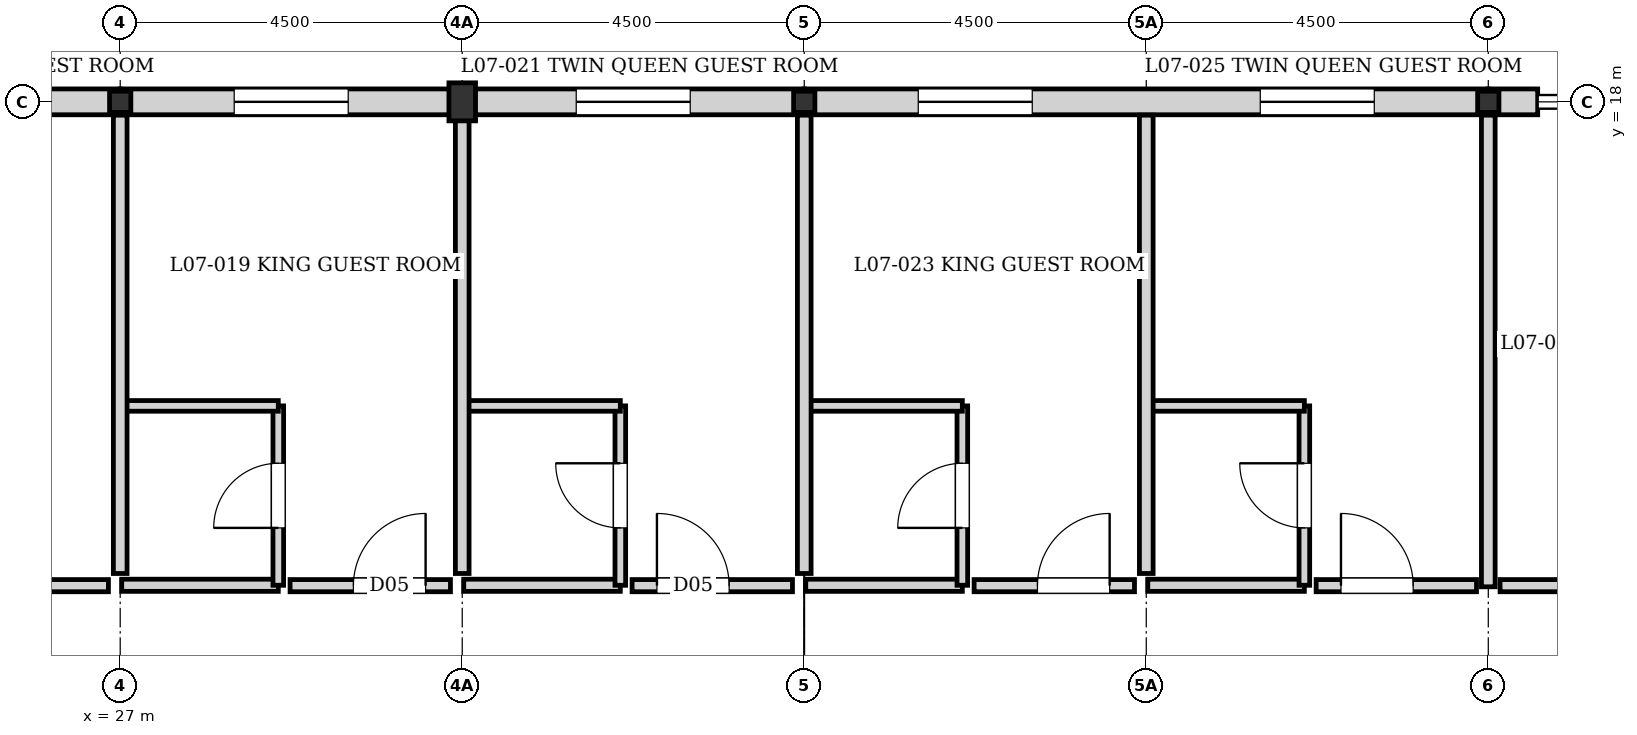
"""IFC4 building model, lengths in metres.
Left out: names, types, materials, properties, quantities, classifications, styles, units other than length and angle.
Written with IfcOpenShell. Run it as: python <this file> out.ifc"""

import sys

from ifc_helpers import new_model, si_unit, direction, frame, frame_2d, origin, origin_2d, place, context, subcontext, project, spatial, rectangle, i_section, extrude, element, fill, save


model = new_model("IFC4")
c1 = context("Model", 3, precision=1e-05, world=origin(), true_north=direction((0.0, 1.0)))
c2 = subcontext(c1, "Body", "Model", "MODEL_VIEW")
j1 = project(units=[si_unit("LENGTHUNIT", "METRE"), si_unit("PLANEANGLEUNIT", "RADIAN")], contexts=[c1])
p1 = place(None, origin())
s1 = spatial("IfcSite", under=j1, at=p1, CompositionType="ELEMENT")
p2 = place(p1, origin())
s2 = spatial("IfcBuilding", under=s1, at=p2, CompositionType="ELEMENT")
p3 = place(p2, frame((0.0, 0.0, 23.68)))
s3 = spatial("IfcBuildingStorey", under=s2, at=p3, CompositionType="ELEMENT", Elevation=23.68)
for number, where, z_axis, x_axis in (
    (1, (27.0, 18.0, 0.0), (0.0, 0.0, 1.0), (1.0, 0.0, 0.0)),
    (2, (36.0, 18.0, 0.0), (0.0, 0.0, 1.0), (1.0, 0.0, 0.0)),
    (3, (45.0, 18.0, 0.0), (0.0, 0.0, 1.0), (1.0, 0.0, 0.0)),
):
    element("IfcColumn", number, at=place(p3, frame(where, z_axis=z_axis, x_axis=x_axis)), inside=s3, PredefinedType="COLUMN", context=c2, shape_type="SweptSolid", body=[
        extrude(i_section(OverallWidth=0.28, OverallDepth=0.28, WebThickness=0.01, FlangeThickness=0.018, at=origin_2d()), origin(), (0.0, 0.0, 1.0), 3.2),
    ])
p4 = place(p3, frame((31.5, 18.0, 0.0), z_axis=(0.0, 0.0, 1.0), x_axis=(1.0, 0.0, 0.0)))
e4 = element("IfcColumn", 4, at=p4, inside=s3, PredefinedType="PILASTER", context=c2, shape_type="SweptSolid", body=[
    extrude(rectangle(XDim=0.35, YDim=0.5, at=origin_2d()), origin(), (0.0, 0.0, 1.0), 3.2),
])
p5 = place(p3, frame((18.0, 18.0, 0.0), z_axis=(0.0, 0.0, 1.0), x_axis=(1.0, 0.0, 0.0)))
e5 = element("IfcWall", 5, at=p5, inside=s3, PredefinedType="SOLIDWALL", context=c2, shape_type="SweptSolid", body=[
    extrude(rectangle(XDim=9.0, YDim=0.34, at=frame_2d((4.5, 0.0))), origin(), (0.0, 0.0, 1.0), 2.56),
])
p6 = place(p5, frame((1.5, 0.0, 0.35)))
e6 = element("IfcOpeningElement", 6, at=p6, cuts=e5, PredefinedType="OPENING", context=c2, shape_type="SweptSolid", body=[
    extrude(rectangle(XDim=1.5, YDim=1.8, at=frame_2d((0.75, 0.9))), frame((0.0, 0.18, 0.0), z_axis=(0.0, -1.0, 0.0), x_axis=(1.0, 0.0, 0.0)), (0.0, 0.0, 1.0), 0.36),
])
p7 = place(p5, frame((6.0, 0.0, 0.35)))
e7 = element("IfcOpeningElement", 7, at=p7, cuts=e5, PredefinedType="OPENING", context=c2, shape_type="SweptSolid", body=[
    extrude(rectangle(XDim=1.5, YDim=1.8, at=frame_2d((0.75, 0.9))), frame((0.0, 0.18, 0.0), z_axis=(0.0, -1.0, 0.0), x_axis=(1.0, 0.0, 0.0)), (0.0, 0.0, 1.0), 0.36),
])
p8 = place(p3, frame((27.0, 18.0, 0.0), z_axis=(0.0, 0.0, 1.0), x_axis=(1.0, 0.0, 0.0)))
e8 = element("IfcWall", 8, at=p8, inside=s3, PredefinedType="SOLIDWALL", context=c2, shape_type="SweptSolid", body=[
    extrude(rectangle(XDim=9.0, YDim=0.34, at=frame_2d((4.5, 0.0))), origin(), (0.0, 0.0, 1.0), 2.73),
])
p9 = place(p8, frame((1.5, 0.0, 0.35)))
e9 = element("IfcOpeningElement", 9, at=p9, cuts=e8, PredefinedType="OPENING", context=c2, shape_type="SweptSolid", body=[
    extrude(rectangle(XDim=1.5, YDim=1.8, at=frame_2d((0.75, 0.9))), frame((0.0, 0.18, 0.0), z_axis=(0.0, -1.0, 0.0), x_axis=(1.0, 0.0, 0.0)), (0.0, 0.0, 1.0), 0.36),
])
p10 = place(p8, frame((6.0, 0.0, 0.35)))
e10 = element("IfcOpeningElement", 10, at=p10, cuts=e8, PredefinedType="OPENING", context=c2, shape_type="SweptSolid", body=[
    extrude(rectangle(XDim=1.5, YDim=1.8, at=frame_2d((0.75, 0.9))), frame((0.0, 0.18, 0.0), z_axis=(0.0, -1.0, 0.0), x_axis=(1.0, 0.0, 0.0)), (0.0, 0.0, 1.0), 0.36),
])
p11 = place(p3, frame((36.0, 18.0, 0.0), z_axis=(0.0, 0.0, 1.0), x_axis=(1.0, 0.0, 0.0)))
e11 = element("IfcWall", 11, at=p11, inside=s3, PredefinedType="SOLIDWALL", context=c2, shape_type="SweptSolid", body=[
    extrude(rectangle(XDim=9.0, YDim=0.34, at=frame_2d((4.5, 0.0))), origin(), (0.0, 0.0, 1.0), 2.66),
])
p12 = place(p11, frame((1.5, 0.0, 0.35)))
e12 = element("IfcOpeningElement", 12, at=p12, cuts=e11, PredefinedType="OPENING", context=c2, shape_type="SweptSolid", body=[
    extrude(rectangle(XDim=1.5, YDim=1.8, at=frame_2d((0.75, 0.9))), frame((0.0, 0.18, 0.0), z_axis=(0.0, -1.0, 0.0), x_axis=(1.0, 0.0, 0.0)), (0.0, 0.0, 1.0), 0.36),
])
p13 = place(p11, frame((6.0, 0.0, 0.35)))
e13 = element("IfcOpeningElement", 13, at=p13, cuts=e11, PredefinedType="OPENING", context=c2, shape_type="SweptSolid", body=[
    extrude(rectangle(XDim=1.5, YDim=1.8, at=frame_2d((0.75, 0.9))), frame((0.0, 0.18, 0.0), z_axis=(0.0, -1.0, 0.0), x_axis=(1.0, 0.0, 0.0)), (0.0, 0.0, 1.0), 0.36),
])
p14 = place(p3, frame((45.0, 18.0, 0.0), z_axis=(0.0, 0.0, 1.0), x_axis=(1.0, 0.0, 0.0)))
e14 = element("IfcWall", 14, at=p14, inside=s3, PredefinedType="SOLIDWALL", context=c2, shape_type="SweptSolid", body=[
    extrude(rectangle(XDim=0.65, YDim=0.34, at=frame_2d((0.325, 0.0))), origin(), (0.0, 0.0, 1.0), 2.6),
])
p15 = place(p3, frame((27.02, 11.64, 0.0), z_axis=(0.0, 0.0, 1.0), x_axis=(1.0, 0.0, 0.0)))
e15 = element("IfcWall", 15, at=p15, inside=s3, PredefinedType="PARTITIONING", context=c2, shape_type="SweptSolid", body=[
    extrude(rectangle(XDim=2.06, YDim=0.16, at=frame_2d((1.03, 0.0))), origin(), (0.0, 0.0, 1.0), 2.96),
])
p16 = place(p3, frame((29.08, 11.64, 0.0), z_axis=(0.0, 0.0, 1.0), x_axis=(0.0, 1.0, 0.0)))
e16 = element("IfcWall", 16, at=p16, inside=s3, PredefinedType="PLUMBINGWALL", context=c2, shape_type="SweptSolid", body=[
    extrude(rectangle(XDim=2.36, YDim=0.14, at=frame_2d((1.18, 0.0))), origin(), (0.0, 0.0, 1.0), 2.96),
])
p17 = place(p16, frame((0.755, 0.0, 0.0)))
e17 = element("IfcOpeningElement", 17, at=p17, cuts=e16, PredefinedType="OPENING", context=c2, shape_type="SweptSolid", body=[
    extrude(rectangle(XDim=0.85, YDim=2.04, at=frame_2d((0.425, 1.02))), frame((0.0, 0.08, 0.0), z_axis=(0.0, -1.0, 0.0), x_axis=(1.0, 0.0, 0.0)), (0.0, 0.0, 1.0), 0.16),
])
p18 = place(p3, frame((27.02, 14.0, 0.0), z_axis=(0.0, 0.0, 1.0), x_axis=(1.0, 0.0, 0.0)))
e18 = element("IfcWall", 18, at=p18, inside=s3, PredefinedType="PLUMBINGWALL", context=c2, shape_type="SweptSolid", body=[
    extrude(rectangle(XDim=2.06, YDim=0.14, at=frame_2d((1.03, 0.0))), origin(), (0.0, 0.0, 1.0), 2.96),
])
p19 = place(p3, frame((31.52, 11.64, 0.0), z_axis=(0.0, 0.0, 1.0), x_axis=(1.0, 0.0, 0.0)))
e19 = element("IfcWall", 19, at=p19, inside=s3, PredefinedType="PARTITIONING", context=c2, shape_type="SweptSolid", body=[
    extrude(rectangle(XDim=2.06, YDim=0.16, at=frame_2d((1.03, 0.0))), origin(), (0.0, 0.0, 1.0), 2.96),
])
p20 = place(p3, frame((33.58, 11.64, 0.0), z_axis=(0.0, 0.0, 1.0), x_axis=(0.0, 1.0, 0.0)))
e20 = element("IfcWall", 20, at=p20, inside=s3, PredefinedType="PLUMBINGWALL", context=c2, shape_type="SweptSolid", body=[
    extrude(rectangle(XDim=2.36, YDim=0.14, at=frame_2d((1.18, 0.0))), origin(), (0.0, 0.0, 1.0), 2.96),
])
p21 = place(p20, frame((0.755, 0.0, 0.0)))
e21 = element("IfcOpeningElement", 21, at=p21, cuts=e20, PredefinedType="OPENING", context=c2, shape_type="SweptSolid", body=[
    extrude(rectangle(XDim=0.85, YDim=2.04, at=frame_2d((0.425, 1.02))), frame((0.0, 0.08, 0.0), z_axis=(0.0, -1.0, 0.0), x_axis=(1.0, 0.0, 0.0)), (0.0, 0.0, 1.0), 0.16),
])
p22 = place(p3, frame((31.52, 14.0, 0.0), z_axis=(0.0, 0.0, 1.0), x_axis=(1.0, 0.0, 0.0)))
e22 = element("IfcWall", 22, at=p22, inside=s3, PredefinedType="PLUMBINGWALL", context=c2, shape_type="SweptSolid", body=[
    extrude(rectangle(XDim=2.06, YDim=0.14, at=frame_2d((1.03, 0.0))), origin(), (0.0, 0.0, 1.0), 2.96),
])
p23 = place(p3, frame((36.02, 11.64, 0.0), z_axis=(0.0, 0.0, 1.0), x_axis=(1.0, 0.0, 0.0)))
e23 = element("IfcWall", 23, at=p23, inside=s3, PredefinedType="PARTITIONING", context=c2, shape_type="SweptSolid", body=[
    extrude(rectangle(XDim=2.06, YDim=0.16, at=frame_2d((1.03, 0.0))), origin(), (0.0, 0.0, 1.0), 2.96),
])
p24 = place(p3, frame((38.08, 11.64, 0.0), z_axis=(0.0, 0.0, 1.0), x_axis=(0.0, 1.0, 0.0)))
e24 = element("IfcWall", 24, at=p24, inside=s3, PredefinedType="PLUMBINGWALL", context=c2, shape_type="SweptSolid", body=[
    extrude(rectangle(XDim=2.36, YDim=0.14, at=frame_2d((1.18, 0.0))), origin(), (0.0, 0.0, 1.0), 2.96),
])
p25 = place(p24, frame((0.755, 0.0, 0.0)))
e25 = element("IfcOpeningElement", 25, at=p25, cuts=e24, PredefinedType="OPENING", context=c2, shape_type="SweptSolid", body=[
    extrude(rectangle(XDim=0.85, YDim=2.04, at=frame_2d((0.425, 1.02))), frame((0.0, 0.08, 0.0), z_axis=(0.0, -1.0, 0.0), x_axis=(1.0, 0.0, 0.0)), (0.0, 0.0, 1.0), 0.16),
])
p26 = place(p3, frame((36.02, 14.0, 0.0), z_axis=(0.0, 0.0, 1.0), x_axis=(1.0, 0.0, 0.0)))
e26 = element("IfcWall", 26, at=p26, inside=s3, PredefinedType="PLUMBINGWALL", context=c2, shape_type="SweptSolid", body=[
    extrude(rectangle(XDim=2.06, YDim=0.14, at=frame_2d((1.03, 0.0))), origin(), (0.0, 0.0, 1.0), 2.96),
])
p27 = place(p3, frame((40.52, 11.64, 0.0), z_axis=(0.0, 0.0, 1.0), x_axis=(1.0, 0.0, 0.0)))
e27 = element("IfcWall", 27, at=p27, inside=s3, PredefinedType="PARTITIONING", context=c2, shape_type="SweptSolid", body=[
    extrude(rectangle(XDim=2.06, YDim=0.16, at=frame_2d((1.03, 0.0))), origin(), (0.0, 0.0, 1.0), 2.96),
])
p28 = place(p3, frame((42.58, 11.64, 0.0), z_axis=(0.0, 0.0, 1.0), x_axis=(0.0, 1.0, 0.0)))
e28 = element("IfcWall", 28, at=p28, inside=s3, PredefinedType="PLUMBINGWALL", context=c2, shape_type="SweptSolid", body=[
    extrude(rectangle(XDim=2.36, YDim=0.14, at=frame_2d((1.18, 0.0))), origin(), (0.0, 0.0, 1.0), 2.96),
])
p29 = place(p28, frame((0.755, 0.0, 0.0)))
e29 = element("IfcOpeningElement", 29, at=p29, cuts=e28, PredefinedType="OPENING", context=c2, shape_type="SweptSolid", body=[
    extrude(rectangle(XDim=0.85, YDim=2.04, at=frame_2d((0.425, 1.02))), frame((0.0, 0.08, 0.0), z_axis=(0.0, -1.0, 0.0), x_axis=(1.0, 0.0, 0.0)), (0.0, 0.0, 1.0), 0.16),
])
p30 = place(p3, frame((40.52, 14.0, 0.0), z_axis=(0.0, 0.0, 1.0), x_axis=(1.0, 0.0, 0.0)))
e30 = element("IfcWall", 30, at=p30, inside=s3, PredefinedType="PLUMBINGWALL", context=c2, shape_type="SweptSolid", body=[
    extrude(rectangle(XDim=2.06, YDim=0.14, at=frame_2d((1.03, 0.0))), origin(), (0.0, 0.0, 1.0), 2.96),
])
p31 = place(p3, frame((27.0, 11.795, 0.0), z_axis=(0.0, 0.0, 1.0), x_axis=(0.0, 1.0, 0.0)))
e31 = element("IfcWall", 31, at=p31, inside=s3, PredefinedType="PARTITIONING", context=c2, shape_type="SweptSolid", body=[
    extrude(rectangle(XDim=6.03, YDim=0.18, at=frame_2d((3.015, 0.0))), origin(), (0.0, 0.0, 1.0), 2.27),
])
p32 = place(p3, frame((31.5, 11.795, 0.0), z_axis=(0.0, 0.0, 1.0), x_axis=(0.0, 1.0, 0.0)))
e32 = element("IfcWall", 32, at=p32, inside=s3, PredefinedType="PARTITIONING", context=c2, shape_type="SweptSolid", body=[
    extrude(rectangle(XDim=6.03, YDim=0.18, at=frame_2d((3.015, 0.0))), origin(), (0.0, 0.0, 1.0), 2.96),
])
p33 = place(p3, frame((36.0, 11.795, 0.0), z_axis=(0.0, 0.0, 1.0), x_axis=(0.0, 1.0, 0.0)))
e33 = element("IfcWall", 33, at=p33, inside=s3, PredefinedType="PARTITIONING", context=c2, shape_type="SweptSolid", body=[
    extrude(rectangle(XDim=6.03, YDim=0.18, at=frame_2d((3.015, 0.0))), origin(), (0.0, 0.0, 1.0), 2.67),
])
p34 = place(p3, frame((40.5, 11.795, 0.0), z_axis=(0.0, 0.0, 1.0), x_axis=(0.0, 1.0, 0.0)))
e34 = element("IfcWall", 34, at=p34, inside=s3, PredefinedType="PARTITIONING", context=c2, shape_type="SweptSolid", body=[
    extrude(rectangle(XDim=6.03, YDim=0.18, at=frame_2d((3.015, 0.0))), origin(), (0.0, 0.0, 1.0), 2.96),
])
p35 = place(p3, frame((45.0, 11.62, 0.0), z_axis=(0.0, 0.0, 1.0), x_axis=(0.0, 1.0, 0.0)))
e35 = element("IfcWall", 35, at=p35, inside=s3, PredefinedType="PARTITIONING", context=c2, shape_type="SweptSolid", body=[
    extrude(rectangle(XDim=6.205, YDim=0.18, at=frame_2d((3.103, 0.0))), origin(), (0.0, 0.0, 1.0), 2.63),
])
p36 = place(p3, frame((24.735, 11.635, 0.0), z_axis=(0.0, 0.0, 1.0), x_axis=(1.0, 0.0, 0.0)))
e36 = element("IfcWall", 36, at=p36, inside=s3, PredefinedType="PARTITIONING", context=c2, shape_type="SweptSolid", body=[
    extrude(rectangle(XDim=2.11, YDim=0.16, at=frame_2d((1.055, 0.0))), origin(), (0.0, 0.0, 1.0), 2.96),
])
p37 = place(p36, frame((0.327, 0.0, 0.0)))
e37 = element("IfcOpeningElement", 37, at=p37, cuts=e36, PredefinedType="OPENING", context=c2, shape_type="SweptSolid", body=[
    extrude(rectangle(XDim=0.95, YDim=2.15, at=frame_2d((0.475, 1.075))), frame((0.0, 0.09, 0.0), z_axis=(0.0, -1.0, 0.0), x_axis=(1.0, 0.0, 0.0)), (0.0, 0.0, 1.0), 0.18),
])
p38 = place(p3, frame((29.235, 11.635, 0.0), z_axis=(0.0, 0.0, 1.0), x_axis=(1.0, 0.0, 0.0)))
e38 = element("IfcWall", 38, at=p38, inside=s3, PredefinedType="PARTITIONING", context=c2, shape_type="SweptSolid", body=[
    extrude(rectangle(XDim=2.11, YDim=0.16, at=frame_2d((1.055, 0.0))), origin(), (0.0, 0.0, 1.0), 2.96),
])
p39 = place(p38, frame((0.833, 0.0, 0.0)))
e39 = element("IfcOpeningElement", 39, at=p39, cuts=e38, PredefinedType="OPENING", context=c2, shape_type="SweptSolid", body=[
    extrude(rectangle(XDim=0.95, YDim=2.15, at=frame_2d((0.475, 1.075))), frame((0.0, 0.09, 0.0), z_axis=(0.0, -1.0, 0.0), x_axis=(1.0, 0.0, 0.0)), (0.0, 0.0, 1.0), 0.18),
])
p40 = place(p3, frame((33.735, 11.635, 0.0), z_axis=(0.0, 0.0, 1.0), x_axis=(1.0, 0.0, 0.0)))
e40 = element("IfcWall", 40, at=p40, inside=s3, PredefinedType="PARTITIONING", context=c2, shape_type="SweptSolid", body=[
    extrude(rectangle(XDim=2.11, YDim=0.16, at=frame_2d((1.055, 0.0))), origin(), (0.0, 0.0, 1.0), 2.96),
])
p41 = place(p40, frame((0.327, 0.0, 0.0)))
e41 = element("IfcOpeningElement", 41, at=p41, cuts=e40, PredefinedType="OPENING", context=c2, shape_type="SweptSolid", body=[
    extrude(rectangle(XDim=0.95, YDim=2.15, at=frame_2d((0.475, 1.075))), frame((0.0, 0.09, 0.0), z_axis=(0.0, -1.0, 0.0), x_axis=(1.0, 0.0, 0.0)), (0.0, 0.0, 1.0), 0.18),
])
p42 = place(p3, frame((38.235, 11.635, 0.0), z_axis=(0.0, 0.0, 1.0), x_axis=(1.0, 0.0, 0.0)))
e42 = element("IfcWall", 42, at=p42, inside=s3, PredefinedType="PARTITIONING", context=c2, shape_type="SweptSolid", body=[
    extrude(rectangle(XDim=2.11, YDim=0.16, at=frame_2d((1.055, 0.0))), origin(), (0.0, 0.0, 1.0), 2.96),
])
p43 = place(p42, frame((0.833, 0.0, 0.0)))
e43 = element("IfcOpeningElement", 43, at=p43, cuts=e42, PredefinedType="OPENING", context=c2, shape_type="SweptSolid", body=[
    extrude(rectangle(XDim=0.95, YDim=2.15, at=frame_2d((0.475, 1.075))), frame((0.0, 0.09, 0.0), z_axis=(0.0, -1.0, 0.0), x_axis=(1.0, 0.0, 0.0)), (0.0, 0.0, 1.0), 0.18),
])
p44 = place(p3, frame((42.735, 11.635, 0.0), z_axis=(0.0, 0.0, 1.0), x_axis=(1.0, 0.0, 0.0)))
e44 = element("IfcWall", 44, at=p44, inside=s3, PredefinedType="PARTITIONING", context=c2, shape_type="SweptSolid", body=[
    extrude(rectangle(XDim=2.11, YDim=0.16, at=frame_2d((1.055, 0.0))), origin(), (0.0, 0.0, 1.0), 2.96),
])
p45 = place(p44, frame((0.327, 0.0, 0.0)))
e45 = element("IfcOpeningElement", 45, at=p45, cuts=e44, PredefinedType="OPENING", context=c2, shape_type="SweptSolid", body=[
    extrude(rectangle(XDim=0.95, YDim=2.15, at=frame_2d((0.475, 1.075))), frame((0.0, 0.09, 0.0), z_axis=(0.0, -1.0, 0.0), x_axis=(1.0, 0.0, 0.0)), (0.0, 0.0, 1.0), 0.18),
])
p46 = place(p3, frame((45.155, 11.635, 0.0), z_axis=(0.0, 0.0, 1.0), x_axis=(1.0, 0.0, 0.0)))
e46 = element("IfcWall", 46, at=p46, inside=s3, PredefinedType="PARTITIONING", context=c2, shape_type="SweptSolid", body=[
    extrude(rectangle(XDim=8.67, YDim=0.16, at=frame_2d((4.335, 0.0))), origin(), (0.0, 0.0, 1.0), 2.96),
])
p47 = place(p46, frame((3.835, 0.0, 0.0)))
e47 = element("IfcOpeningElement", 47, at=p47, cuts=e46, PredefinedType="OPENING", context=c2, shape_type="SweptSolid", body=[
    extrude(rectangle(XDim=1.0, YDim=2.1, at=frame_2d((0.5, 1.05))), frame((0.0, 0.09, 0.0), z_axis=(0.0, -1.0, 0.0), x_axis=(1.0, 0.0, 0.0)), (0.0, 0.0, 1.0), 0.18),
])
p48 = place(p9, origin())
e48 = element("IfcWindow", 48, at=p48, inside=s3, PartitioningType="SINGLE_PANEL", PredefinedType="WINDOW", context=c2, shape_type="SweptSolid", body=[
    extrude(rectangle(XDim=1.5, YDim=1.8, at=frame_2d((0.75, 0.9))), frame((0.0, 0.03, 0.0), z_axis=(0.0, -1.0, 0.0), x_axis=(1.0, 0.0, 0.0)), (0.0, 0.0, 1.0), 0.06),
])
fill(e9, e48)
p49 = place(p10, origin())
e49 = element("IfcWindow", 49, at=p49, inside=s3, PartitioningType="SINGLE_PANEL", PredefinedType="WINDOW", context=c2, shape_type="SweptSolid", body=[
    extrude(rectangle(XDim=1.5, YDim=1.8, at=frame_2d((0.75, 0.9))), frame((0.0, 0.03, 0.0), z_axis=(0.0, -1.0, 0.0), x_axis=(1.0, 0.0, 0.0)), (0.0, 0.0, 1.0), 0.06),
])
fill(e10, e49)
p50 = place(p12, origin())
e50 = element("IfcWindow", 50, at=p50, inside=s3, PartitioningType="SINGLE_PANEL", PredefinedType="WINDOW", context=c2, shape_type="SweptSolid", body=[
    extrude(rectangle(XDim=1.5, YDim=1.8, at=frame_2d((0.75, 0.9))), frame((0.0, 0.03, 0.0), z_axis=(0.0, -1.0, 0.0), x_axis=(1.0, 0.0, 0.0)), (0.0, 0.0, 1.0), 0.06),
])
fill(e12, e50)
p51 = place(p13, origin())
e51 = element("IfcWindow", 51, at=p51, inside=s3, PartitioningType="SINGLE_PANEL", PredefinedType="WINDOW", context=c2, shape_type="SweptSolid", body=[
    extrude(rectangle(XDim=1.5, YDim=1.8, at=frame_2d((0.75, 0.9))), frame((0.0, 0.03, 0.0), z_axis=(0.0, -1.0, 0.0), x_axis=(1.0, 0.0, 0.0)), (0.0, 0.0, 1.0), 0.06),
])
fill(e13, e51)
p52 = place(p17, origin())
e52 = element("IfcDoor", 52, at=p52, inside=s3, OperationType="SINGLE_SWING_LEFT", PredefinedType="DOOR", context=c2, shape_type="SweptSolid", body=[
    extrude(rectangle(XDim=0.85, YDim=2.04, at=frame_2d((0.425, 1.02))), frame((0.0, 0.025, 0.0), z_axis=(0.0, -1.0, 0.0), x_axis=(1.0, 0.0, 0.0)), (0.0, 0.0, 1.0), 0.05),
])
fill(e17, e52)
p53 = place(p21, origin())
e53 = element("IfcDoor", 53, at=p53, inside=s3, OperationType="SINGLE_SWING_RIGHT", PredefinedType="DOOR", context=c2, shape_type="SweptSolid", body=[
    extrude(rectangle(XDim=0.85, YDim=2.04, at=frame_2d((0.425, 1.02))), frame((0.0, 0.025, 0.0), z_axis=(0.0, -1.0, 0.0), x_axis=(1.0, 0.0, 0.0)), (0.0, 0.0, 1.0), 0.05),
])
fill(e21, e53)
p54 = place(p25, origin())
e54 = element("IfcDoor", 54, at=p54, inside=s3, OperationType="SINGLE_SWING_LEFT", PredefinedType="DOOR", context=c2, shape_type="SweptSolid", body=[
    extrude(rectangle(XDim=0.85, YDim=2.04, at=frame_2d((0.425, 1.02))), frame((0.0, 0.025, 0.0), z_axis=(0.0, -1.0, 0.0), x_axis=(1.0, 0.0, 0.0)), (0.0, 0.0, 1.0), 0.05),
])
fill(e25, e54)
p55 = place(p29, origin())
e55 = element("IfcDoor", 55, at=p55, inside=s3, OperationType="SINGLE_SWING_RIGHT", PredefinedType="DOOR", context=c2, shape_type="SweptSolid", body=[
    extrude(rectangle(XDim=0.85, YDim=2.04, at=frame_2d((0.425, 1.02))), frame((0.0, 0.025, 0.0), z_axis=(0.0, -1.0, 0.0), x_axis=(1.0, 0.0, 0.0)), (0.0, 0.0, 1.0), 0.05),
])
fill(e29, e55)
p56 = place(p39, origin())
e56 = element("IfcDoor", 56, at=p56, inside=s3, OperationType="SINGLE_SWING_RIGHT", PredefinedType="DOOR", context=c2, shape_type="SweptSolid", body=[
    extrude(rectangle(XDim=0.95, YDim=2.15, at=frame_2d((0.475, 1.075))), frame((0.0, 0.025, 0.0), z_axis=(0.0, -1.0, 0.0), x_axis=(1.0, 0.0, 0.0)), (0.0, 0.0, 1.0), 0.05),
])
fill(e39, e56)
p57 = place(p41, origin())
e57 = element("IfcDoor", 57, at=p57, inside=s3, OperationType="SINGLE_SWING_LEFT", PredefinedType="DOOR", context=c2, shape_type="SweptSolid", body=[
    extrude(rectangle(XDim=0.95, YDim=2.15, at=frame_2d((0.475, 1.075))), frame((0.0, 0.025, 0.0), z_axis=(0.0, -1.0, 0.0), x_axis=(1.0, 0.0, 0.0)), (0.0, 0.0, 1.0), 0.05),
])
fill(e41, e57)
p58 = place(p43, origin())
e58 = element("IfcDoor", 58, at=p58, inside=s3, OperationType="SINGLE_SWING_RIGHT", PredefinedType="DOOR", context=c2, shape_type="SweptSolid", body=[
    extrude(rectangle(XDim=0.95, YDim=2.15, at=frame_2d((0.475, 1.075))), frame((0.0, 0.025, 0.0), z_axis=(0.0, -1.0, 0.0), x_axis=(1.0, 0.0, 0.0)), (0.0, 0.0, 1.0), 0.05),
])
fill(e43, e58)
p59 = place(p45, origin())
e59 = element("IfcDoor", 59, at=p59, inside=s3, OperationType="SINGLE_SWING_LEFT", PredefinedType="DOOR", context=c2, shape_type="SweptSolid", body=[
    extrude(rectangle(XDim=0.95, YDim=2.15, at=frame_2d((0.475, 1.075))), frame((0.0, 0.025, 0.0), z_axis=(0.0, -1.0, 0.0), x_axis=(1.0, 0.0, 0.0)), (0.0, 0.0, 1.0), 0.05),
])
fill(e45, e59)
save(model, sys.argv[1])
